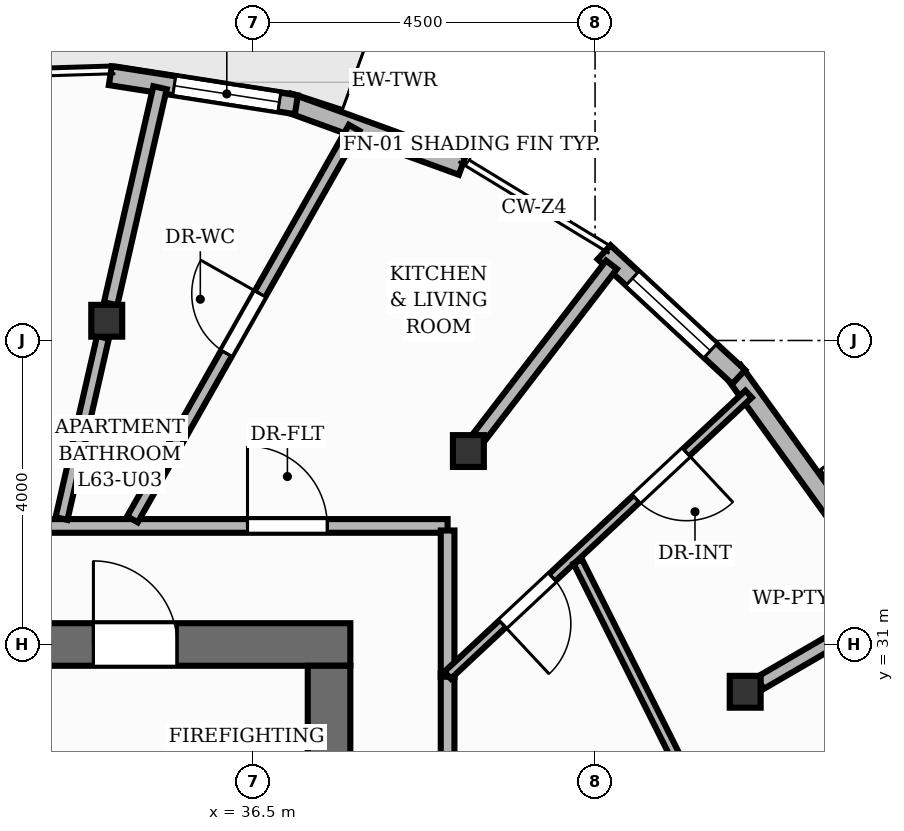
"""IFC4 building model, lengths in metres.
Left out: names, types, materials, properties, quantities, classifications, styles, units other than length and angle.
Written with IfcOpenShell. Run it as: python <this file> out.ifc"""

import sys

from ifc_helpers import new_model, si_unit, direction, frame, frame_2d, origin, origin_2d, place, context, subcontext, project, spatial, rectangle, i_section, extrude, element, fill, save


model = new_model("IFC4")
c1 = context("Model", 3, precision=1e-05, world=origin(), true_north=direction((0.0, 1.0)))
c2 = subcontext(c1, "Body", "Model", "MODEL_VIEW")
j1 = project(units=[si_unit("LENGTHUNIT", "METRE"), si_unit("PLANEANGLEUNIT", "RADIAN")], contexts=[c1])
p1 = place(None, origin())
s1 = spatial("IfcSite", under=j1, at=p1, CompositionType="ELEMENT")
p2 = place(p1, origin())
s2 = spatial("IfcBuilding", under=s1, at=p2, CompositionType="ELEMENT")
p3 = place(p2, frame((0.0, 0.0, 211.04)))
s3 = spatial("IfcBuildingStorey", under=s2, at=p3, CompositionType="ELEMENT", Elevation=211.04)
p4 = place(p3, frame((26.22, 31.0, 0.0), z_axis=(0.0, 0.0, 1.0), x_axis=(1.0, 0.0, 0.0)))
e1 = element("IfcWall", 1, at=p4, inside=s3, PredefinedType="SHEAR", context=c2, shape_type="SweptSolid", body=[
    extrude(rectangle(XDim=11.56, YDim=0.56, at=frame_2d((5.78, 0.0))), origin(), (0.0, 0.0, 1.0), 3.2),
])
p5 = place(p4, frame((8.18, 0.0, 0.0)))
e2 = element("IfcOpeningElement", 2, at=p5, cuts=e1, PredefinedType="OPENING", context=c2, shape_type="SweptSolid", body=[
    extrude(rectangle(XDim=1.1, YDim=2.15, at=frame_2d((0.55, 1.075))), frame((0.0, 0.29, 0.0), z_axis=(0.0, -1.0, 0.0), x_axis=(1.0, 0.0, 0.0)), (0.0, 0.0, 1.0), 0.58),
])
p6 = place(p4, frame((0.805, 0.0, 0.0)))
e3 = element("IfcOpeningElement", 3, at=p6, cuts=e1, PredefinedType="OPENING", context=c2, shape_type="SweptSolid", body=[
    extrude(rectangle(XDim=1.05, YDim=2.15, at=frame_2d((0.525, 1.075))), frame((0.0, 0.29, 0.0), z_axis=(0.0, -1.0, 0.0), x_axis=(1.0, 0.0, 0.0)), (0.0, 0.0, 1.0), 0.58),
])
p7 = place(p4, frame((2.555, 0.0, 0.0)))
e4 = element("IfcOpeningElement", 4, at=p7, cuts=e1, PredefinedType="OPENING", context=c2, shape_type="SweptSolid", body=[
    extrude(rectangle(XDim=1.05, YDim=2.15, at=frame_2d((0.525, 1.075))), frame((0.0, 0.29, 0.0), z_axis=(0.0, -1.0, 0.0), x_axis=(1.0, 0.0, 0.0)), (0.0, 0.0, 1.0), 0.58),
])
p8 = place(p4, frame((4.305, 0.0, 0.0)))
e5 = element("IfcOpeningElement", 5, at=p8, cuts=e1, PredefinedType="OPENING", context=c2, shape_type="SweptSolid", body=[
    extrude(rectangle(XDim=1.05, YDim=2.15, at=frame_2d((0.525, 1.075))), frame((0.0, 0.29, 0.0), z_axis=(0.0, -1.0, 0.0), x_axis=(1.0, 0.0, 0.0)), (0.0, 0.0, 1.0), 0.58),
])
p9 = place(p3, frame((37.5, 17.28, 0.0), z_axis=(0.0, 0.0, 1.0), x_axis=(0.0, 1.0, 0.0)))
e6 = element("IfcWall", 6, at=p9, inside=s3, PredefinedType="SHEAR", context=c2, shape_type="SweptSolid", body=[
    extrude(rectangle(XDim=13.44, YDim=0.56, at=frame_2d((6.72, 0.0))), origin(), (0.0, 0.0, 1.0), 3.2),
])
for number, where, z_axis, x_axis in (
    (7, (42.975, 30.378, 0.0), (0.0, 0.0, 1.0), (1.0, 0.0, 0.0)),
    (8, (39.333, 33.545, 0.0), (0.0, 0.0, 1.0), (1.0, 0.0, 0.0)),
    (9, (34.575, 35.26, 0.0), (0.0, 0.0, 1.0), (1.0, 0.0, 0.0)),
):
    element("IfcColumn", number, at=place(p3, frame(where, z_axis=z_axis, x_axis=x_axis)), inside=s3, PredefinedType="COLUMN", context=c2, shape_type="SweptSolid", body=[
        extrude(i_section(OverallWidth=0.407, OverallDepth=0.419, WebThickness=0.031, FlangeThickness=0.049, at=origin_2d()), origin(), (0.0, 0.0, 1.0), 3.2),
    ])
p10 = place(p3, frame((36.96, 38.13, 0.0), z_axis=(0.0, 0.0, 1.0), x_axis=(0.939954186413, -0.341300640851, 0.0)))
e10 = element("IfcWall", 10, at=p10, inside=s3, PredefinedType="SOLIDWALL", context=c2, shape_type="SweptSolid", body=[
    extrude(rectangle(XDim=2.437, YDim=0.25, at=frame_2d((1.219, 0.0))), origin(), (0.0, 0.0, 1.0), 2.96),
])
p11 = place(p3, frame((34.622, 38.484, 0.0), z_axis=(0.0, 0.0, 1.0), x_axis=(0.988040195026, -0.154196540209, 0.0)))
e11 = element("IfcWall", 11, at=p11, inside=s3, PredefinedType="SOLIDWALL", context=c2, shape_type="SweptSolid", body=[
    extrude(rectangle(XDim=2.478, YDim=0.25, at=frame_2d((1.239, 0.0))), origin(), (0.0, 0.0, 1.0), 2.96),
])
p12 = place(p11, frame((0.851, 0.0, 0.85)))
e12 = element("IfcOpeningElement", 12, at=p12, cuts=e11, PredefinedType="OPENING", context=c2, shape_type="SweptSolid", body=[
    extrude(rectangle(XDim=1.4, YDim=1.52, at=frame_2d((0.7, 0.76))), frame((0.0, 0.135, 0.0), z_axis=(0.0, -1.0, 0.0), x_axis=(1.0, 0.0, 0.0)), (0.0, 0.0, 1.0), 0.27),
])
p13 = place(p3, frame((42.814, 34.605, 0.0), z_axis=(0.0, 0.0, 1.0), x_axis=(0.584824573101, -0.811159798497, 0.0)))
e13 = element("IfcWall", 13, at=p13, inside=s3, PredefinedType="SOLIDWALL", context=c2, shape_type="SweptSolid", body=[
    extrude(rectangle(XDim=2.437, YDim=0.25, at=frame_2d((1.218, 0.0))), origin(), (0.0, 0.0, 1.0), 2.96),
])
p14 = place(p3, frame((41.119, 36.161, 0.0), z_axis=(0.0, 0.0, 1.0), x_axis=(0.733441361842, -0.679752726173, 0.0)))
e14 = element("IfcWall", 14, at=p14, inside=s3, PredefinedType="SOLIDWALL", context=c2, shape_type="SweptSolid", body=[
    extrude(rectangle(XDim=2.415, YDim=0.25, at=frame_2d((1.207, 0.0))), origin(), (0.0, 0.0, 1.0), 2.96),
])
p15 = place(p14, frame((0.507, 0.0, 0.85)))
e15 = element("IfcOpeningElement", 15, at=p15, cuts=e14, PredefinedType="OPENING", context=c2, shape_type="SweptSolid", body=[
    extrude(rectangle(XDim=1.4, YDim=1.55, at=frame_2d((0.7, 0.775))), frame((0.0, 0.135, 0.0), z_axis=(0.0, -1.0, 0.0), x_axis=(1.0, 0.0, 0.0)), (0.0, 0.0, 1.0), 0.27),
])
p16 = place(p3, frame((43.174, 30.493, 0.0), z_axis=(0.0, 0.0, 1.0), x_axis=(0.864637155841, 0.502396843879, 0.0)))
e16 = element("IfcWall", 16, at=p16, inside=s3, PredefinedType="PARTITIONING", context=c2, shape_type="SweptSolid", body=[
    extrude(rectangle(XDim=1.803, YDim=0.18, at=frame_2d((0.901, 0.0))), origin(), (0.0, 0.0, 1.0), 2.403),
])
p17 = place(p3, frame((39.473, 33.727, 0.0), z_axis=(0.0, 0.0, 1.0), x_axis=(0.609244614772, 0.792982344931, 0.0)))
e17 = element("IfcWall", 17, at=p17, inside=s3, PredefinedType="PARTITIONING", context=c2, shape_type="SweptSolid", body=[
    extrude(rectangle(XDim=2.861, YDim=0.18, at=frame_2d((1.43, 0.0))), origin(), (0.0, 0.0, 1.0), 2.403),
])
p18 = place(p3, frame((34.626, 35.483, 0.0), z_axis=(0.0, 0.0, 1.0), x_axis=(0.222945280676, 0.974830960641, 0.0)))
e18 = element("IfcWall", 18, at=p18, inside=s3, PredefinedType="PARTITIONING", context=c2, shape_type="SweptSolid", body=[
    extrude(rectangle(XDim=2.916, YDim=0.18, at=frame_2d((1.458, 0.0))), origin(), (0.0, 0.0, 1.0), 2.403),
])
p19 = place(p3, frame((39.06, 30.623, 0.0), z_axis=(0.0, 0.0, 1.0), x_axis=(0.0, -1.0, 0.0)))
e19 = element("IfcWall", 19, at=p19, inside=s3, PredefinedType="PARTITIONING", context=c2, shape_type="SweptSolid", body=[
    extrude(rectangle(XDim=15.183, YDim=0.18, at=frame_2d((7.591, 0.0))), origin(), (0.0, 0.0, 1.0), 2.955),
])
p20 = place(p19, frame((8.656, 0.0, 0.0)))
e20 = element("IfcOpeningElement", 20, at=p20, cuts=e19, PredefinedType="OPENING", context=c2, shape_type="SweptSolid", body=[
    extrude(rectangle(XDim=1.05, YDim=2.15, at=frame_2d((0.525, 1.075))), frame((0.0, 0.1, 0.0), z_axis=(0.0, -1.0, 0.0), x_axis=(1.0, 0.0, 0.0)), (0.0, 0.0, 1.0), 0.2),
])
p21 = place(p3, frame((33.2, 32.56, 0.0), z_axis=(0.0, 0.0, 1.0), x_axis=(1.0, 0.0, 0.0)))
e21 = element("IfcWall", 21, at=p21, inside=s3, PredefinedType="PARTITIONING", context=c2, shape_type="SweptSolid", body=[
    extrude(rectangle(XDim=5.86, YDim=0.18, at=frame_2d((2.93, 0.0))), origin(), (0.0, 0.0, 1.0), 2.955),
])
p22 = place(p21, frame((3.227, 0.0, 0.0)))
e22 = element("IfcOpeningElement", 22, at=p22, cuts=e21, PredefinedType="OPENING", context=c2, shape_type="SweptSolid", body=[
    extrude(rectangle(XDim=1.05, YDim=2.15, at=frame_2d((0.525, 1.075))), frame((0.0, 0.1, 0.0), z_axis=(0.0, -1.0, 0.0), x_axis=(1.0, 0.0, 0.0)), (0.0, 0.0, 1.0), 0.2),
])
p23 = place(p3, frame((39.06, 32.5, 0.0), z_axis=(0.0, 0.0, 1.0), x_axis=(0.0, -1.0, 0.0)))
e23 = element("IfcWall", 23, at=p23, inside=s3, PredefinedType="PARTITIONING", context=c2, shape_type="SweptSolid", body=[
    extrude(rectangle(XDim=1.925, YDim=0.18, at=frame_2d((0.962, 0.0))), origin(), (0.0, 0.0, 1.0), 2.955),
])
p24 = place(p3, frame((34.914, 32.647, 0.0), z_axis=(0.0, 0.0, 1.0), x_axis=(0.492777372346, 0.870155423648, 0.0)))
e24 = element("IfcWall", 24, at=p24, inside=s3, PredefinedType="PLUMBINGWALL", context=c2, shape_type="SweptSolid", body=[
    extrude(rectangle(XDim=5.919, YDim=0.16, at=frame_2d((2.96, 0.0))), origin(), (0.0, 0.0, 1.0), 2.692),
])
p25 = place(p24, frame((2.51, 0.0, 0.0)))
e25 = element("IfcOpeningElement", 25, at=p25, cuts=e24, PredefinedType="OPENING", context=c2, shape_type="SweptSolid", body=[
    extrude(rectangle(XDim=0.9, YDim=2.1, at=frame_2d((0.45, 1.05))), frame((0.0, 0.09, 0.0), z_axis=(0.0, -1.0, 0.0), x_axis=(1.0, 0.0, 0.0)), (0.0, 0.0, 1.0), 0.18),
])
p26 = place(p3, frame((43.02, 34.294, 0.0), z_axis=(0.0, 0.0, 1.0), x_axis=(-0.730757039427, -0.682637641307, 0.0)))
e26 = element("IfcWall", 26, at=p26, inside=s3, PredefinedType="PARTITIONING", context=c2, shape_type="SweptSolid", body=[
    extrude(rectangle(XDim=5.419, YDim=0.125, at=frame_2d((2.709, 0.0))), origin(), (0.0, 0.0, 1.0), 2.955),
])
p27 = place(p26, frame((1.122, 0.0, 0.0)))
e27 = element("IfcOpeningElement", 27, at=p27, cuts=e26, PredefinedType="OPENING", context=c2, shape_type="SweptSolid", body=[
    extrude(rectangle(XDim=0.9, YDim=2.1, at=frame_2d((0.45, 1.05))), frame((0.0, 0.073, 0.0), z_axis=(0.0, -1.0, 0.0), x_axis=(1.0, 0.0, 0.0)), (0.0, 0.0, 1.0), 0.145),
])
p28 = place(p26, frame((3.531, 0.0, 0.0)))
e28 = element("IfcOpeningElement", 28, at=p28, cuts=e26, PredefinedType="OPENING", context=c2, shape_type="SweptSolid", body=[
    extrude(rectangle(XDim=0.9, YDim=2.1, at=frame_2d((0.45, 1.05))), frame((0.0, 0.073, 0.0), z_axis=(0.0, -1.0, 0.0), x_axis=(1.0, 0.0, 0.0)), (0.0, 0.0, 1.0), 0.145),
])
p29 = place(p3, frame((33.98, 32.657, 0.0), z_axis=(0.0, 0.0, 1.0), x_axis=(0.223006482474, 0.974816961678, 0.0)))
e29 = element("IfcWall", 29, at=p29, inside=s3, PredefinedType="PLUMBINGWALL", context=c2, shape_type="SweptSolid", body=[
    extrude(rectangle(XDim=2.445, YDim=0.16, at=frame_2d((1.222, 0.0))), origin(), (0.0, 0.0, 1.0), 2.403),
])
p30 = place(p3, frame((43.768, 26.114, 0.0), z_axis=(0.0, 0.0, 1.0), x_axis=(-0.447958394428, 0.894054403748, 0.0)))
e30 = element("IfcWall", 30, at=p30, inside=s3, PredefinedType="PARTITIONING", context=c2, shape_type="SweptSolid", body=[
    extrude(rectangle(XDim=6.686, YDim=0.125, at=frame_2d((3.343, 0.0))), origin(), (0.0, 0.0, 1.0), 2.488),
])
p31 = place(p12, origin())
e31 = element("IfcWindow", 31, at=p31, inside=s3, PartitioningType="SINGLE_PANEL", PredefinedType="WINDOW", context=c2, shape_type="SweptSolid", body=[
    extrude(rectangle(XDim=1.4, YDim=1.52, at=frame_2d((0.7, 0.76))), frame((0.0, 0.03, 0.0), z_axis=(0.0, -1.0, 0.0), x_axis=(1.0, 0.0, 0.0)), (0.0, 0.0, 1.0), 0.06),
])
fill(e12, e31)
p32 = place(p15, origin())
e32 = element("IfcWindow", 32, at=p32, inside=s3, PartitioningType="SINGLE_PANEL", PredefinedType="WINDOW", context=c2, shape_type="SweptSolid", body=[
    extrude(rectangle(XDim=1.4, YDim=1.55, at=frame_2d((0.7, 0.775))), frame((0.0, 0.03, 0.0), z_axis=(0.0, -1.0, 0.0), x_axis=(1.0, 0.0, 0.0)), (0.0, 0.0, 1.0), 0.06),
])
fill(e15, e32)
p33 = place(p5, origin())
e33 = element("IfcDoor", 33, at=p33, inside=s3, OperationType="SINGLE_SWING_LEFT", PredefinedType="DOOR", context=c2, shape_type="SweptSolid", body=[
    extrude(rectangle(XDim=1.1, YDim=2.15, at=frame_2d((0.55, 1.075))), frame((0.0, 0.025, 0.0), z_axis=(0.0, -1.0, 0.0), x_axis=(1.0, 0.0, 0.0)), (0.0, 0.0, 1.0), 0.05),
])
fill(e2, e33)
p34 = place(p22, origin())
e34 = element("IfcDoor", 34, at=p34, inside=s3, OperationType="SINGLE_SWING_LEFT", PredefinedType="DOOR", context=c2, shape_type="SweptSolid", body=[
    extrude(rectangle(XDim=1.05, YDim=2.15, at=frame_2d((0.525, 1.075))), frame((0.0, 0.025, 0.0), z_axis=(0.0, -1.0, 0.0), x_axis=(1.0, 0.0, 0.0)), (0.0, 0.0, 1.0), 0.05),
])
fill(e22, e34)
p35 = place(p25, origin())
e35 = element("IfcDoor", 35, at=p35, inside=s3, OperationType="SINGLE_SWING_RIGHT", PredefinedType="DOOR", context=c2, shape_type="SweptSolid", body=[
    extrude(rectangle(XDim=0.9, YDim=2.1, at=frame_2d((0.45, 1.05))), frame((0.0, 0.025, 0.0), z_axis=(0.0, -1.0, 0.0), x_axis=(1.0, 0.0, 0.0)), (0.0, 0.0, 1.0), 0.05),
])
fill(e25, e35)
p36 = place(p27, origin())
e36 = element("IfcDoor", 36, at=p36, inside=s3, OperationType="SINGLE_SWING_LEFT", PredefinedType="DOOR", context=c2, shape_type="SweptSolid", body=[
    extrude(rectangle(XDim=0.9, YDim=2.1, at=frame_2d((0.45, 1.05))), frame((0.0, 0.025, 0.0), z_axis=(0.0, -1.0, 0.0), x_axis=(1.0, 0.0, 0.0)), (0.0, 0.0, 1.0), 0.05),
])
fill(e27, e36)
p37 = place(p28, origin())
e37 = element("IfcDoor", 37, at=p37, inside=s3, OperationType="SINGLE_SWING_RIGHT", PredefinedType="DOOR", context=c2, shape_type="SweptSolid", body=[
    extrude(rectangle(XDim=0.9, YDim=2.1, at=frame_2d((0.45, 1.05))), frame((0.0, 0.025, 0.0), z_axis=(0.0, -1.0, 0.0), x_axis=(1.0, 0.0, 0.0)), (0.0, 0.0, 1.0), 0.05),
])
fill(e28, e37)
save(model, sys.argv[1])
